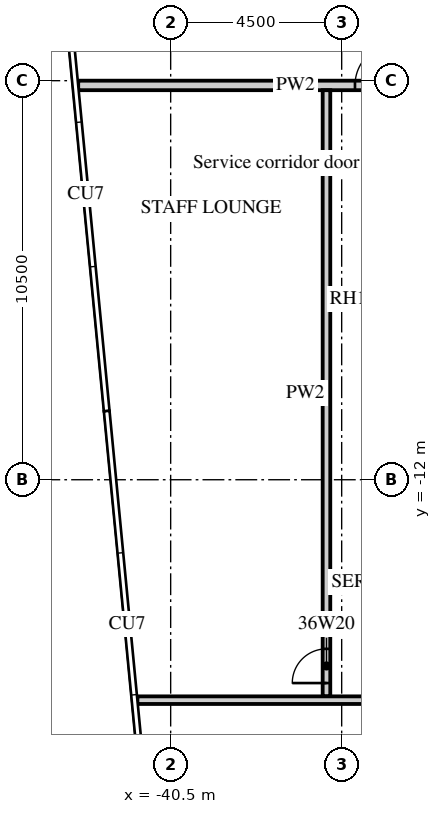
"""IFC4 building model, lengths in metres.
Left out: names, types, materials, properties, quantities, classifications, styles, units other than length and angle.
Written with IfcOpenShell. Run it as: python <this file> out.ifc"""

import sys

from ifc_helpers import new_model, si_unit, direction, frame, frame_2d, origin, place, context, subcontext, project, spatial, rectangle, extrude, element, fill, save


model = new_model("IFC4")
c1 = context("Model", 3, precision=1e-05, world=origin(), true_north=direction((0.0, 1.0)))
c2 = subcontext(c1, "Body", "Model", "MODEL_VIEW")
j1 = project(units=[si_unit("LENGTHUNIT", "METRE"), si_unit("PLANEANGLEUNIT", "RADIAN")], contexts=[c1])
p1 = place(None, origin())
s1 = spatial("IfcSite", under=j1, at=p1, CompositionType="ELEMENT")
p2 = place(p1, origin())
s2 = spatial("IfcBuilding", under=s1, at=p2, CompositionType="ELEMENT")
p3 = place(p2, frame((0.0, 0.0, 155.0)))
s3 = spatial("IfcBuildingStorey", under=s2, at=p3, CompositionType="ELEMENT", Elevation=155.0)
p4 = place(p3, frame((-42.933, -1.625, 0.0), z_axis=(0.0, 0.0, 1.0), x_axis=(1.0, 0.0, 0.0)))
e1 = element("IfcWall", 1, at=p4, inside=s3, PredefinedType="PARTITIONING", context=c2, shape_type="SweptSolid", body=[
    extrude(rectangle(XDim=11.433, YDim=0.25, at=frame_2d((5.716, 0.0))), origin(), (0.0, 0.0, 1.0), 7.0),
])
p5 = place(p4, frame((9.508, 0.0, 0.0)))
e2 = element("IfcOpeningElement", 2, at=p5, cuts=e1, PredefinedType="OPENING", context=c2, shape_type="SweptSolid", body=[
    extrude(rectangle(XDim=1.3, YDim=2.1, at=frame_2d((0.65, 1.05))), frame((0.0, 0.135, 0.0), z_axis=(0.0, -1.0, 0.0), x_axis=(1.0, 0.0, 0.0)), (0.0, 0.0, 1.0), 0.27),
])
p6 = place(p4, frame((7.283, 0.0, 0.0)))
e3 = element("IfcOpeningElement", 3, at=p6, cuts=e1, PredefinedType="OPENING", context=c2, shape_type="SweptSolid", body=[
    extrude(rectangle(XDim=1.1, YDim=2.1, at=frame_2d((0.55, 1.05))), frame((0.0, 0.135, 0.0), z_axis=(0.0, -1.0, 0.0), x_axis=(1.0, 0.0, 0.0)), (0.0, 0.0, 1.0), 0.27),
])
p7 = place(p3, frame((-36.4, -17.7, 0.0), z_axis=(0.0, 0.0, 1.0), x_axis=(0.0, 1.0, 0.0)))
e4 = element("IfcWall", 4, at=p7, inside=s3, PredefinedType="PARTITIONING", context=c2, shape_type="SweptSolid", body=[
    extrude(rectangle(XDim=15.95, YDim=0.2, at=frame_2d((7.975, 0.0))), origin(), (0.0, 0.0, 1.0), 7.0),
])
p8 = place(p7, frame((0.35, 0.0, 0.0)))
e5 = element("IfcOpeningElement", 5, at=p8, cuts=e4, PredefinedType="OPENING", context=c2, shape_type="SweptSolid", body=[
    extrude(rectangle(XDim=0.9, YDim=2.1, at=frame_2d((0.45, 1.05))), frame((0.0, 0.11, 0.0), z_axis=(0.0, -1.0, 0.0), x_axis=(1.0, 0.0, 0.0)), (0.0, 0.0, 1.0), 0.22),
])
p9 = place(p3, frame((-41.375, -17.8, 0.0), z_axis=(0.0, 0.0, 1.0), x_axis=(1.0, 0.0, 0.0)))
e6 = element("IfcWall", 6, at=p9, inside=s3, PredefinedType="PARTITIONING", context=c2, shape_type="SweptSolid", body=[
    extrude(rectangle(XDim=27.775, YDim=0.2, at=frame_2d((13.888, 0.0))), origin(), (0.0, 0.0, 1.0), 7.0),
])
p10 = place(p9, frame((10.263, 0.0, 0.0)))
e7 = element("IfcOpeningElement", 7, at=p10, cuts=e6, PredefinedType="OPENING", context=c2, shape_type="SweptSolid", body=[
    extrude(rectangle(XDim=0.9, YDim=2.1, at=frame_2d((0.45, 1.05))), frame((0.0, 0.11, 0.0), z_axis=(0.0, -1.0, 0.0), x_axis=(1.0, 0.0, 0.0)), (0.0, 0.0, 1.0), 0.22),
])
p11 = place(p9, frame((18.563, 0.0, 0.0)))
e8 = element("IfcOpeningElement", 8, at=p11, cuts=e6, PredefinedType="OPENING", context=c2, shape_type="SweptSolid", body=[
    extrude(rectangle(XDim=0.9, YDim=2.1, at=frame_2d((0.45, 1.05))), frame((0.0, 0.11, 0.0), z_axis=(0.0, -1.0, 0.0), x_axis=(1.0, 0.0, 0.0)), (0.0, 0.0, 1.0), 0.22),
])
p12 = place(p6, origin())
e9 = element("IfcDoor", 9, at=p12, inside=s3, OperationType="SINGLE_SWING_RIGHT", PredefinedType="DOOR", context=c2, shape_type="SweptSolid", body=[
    extrude(rectangle(XDim=1.1, YDim=2.1, at=frame_2d((0.55, 1.05))), frame((0.0, 0.025, 0.0), z_axis=(0.0, -1.0, 0.0), x_axis=(1.0, 0.0, 0.0)), (0.0, 0.0, 1.0), 0.05),
])
fill(e3, e9)
p13 = place(p8, origin())
e10 = element("IfcDoor", 10, at=p13, inside=s3, OperationType="SINGLE_SWING_LEFT", PredefinedType="DOOR", context=c2, shape_type="SweptSolid", body=[
    extrude(rectangle(XDim=0.9, YDim=2.1, at=frame_2d((0.45, 1.05))), frame((0.0, 0.025, 0.0), z_axis=(0.0, -1.0, 0.0), x_axis=(1.0, 0.0, 0.0)), (0.0, 0.0, 1.0), 0.05),
])
fill(e5, e10)
save(model, sys.argv[1])
